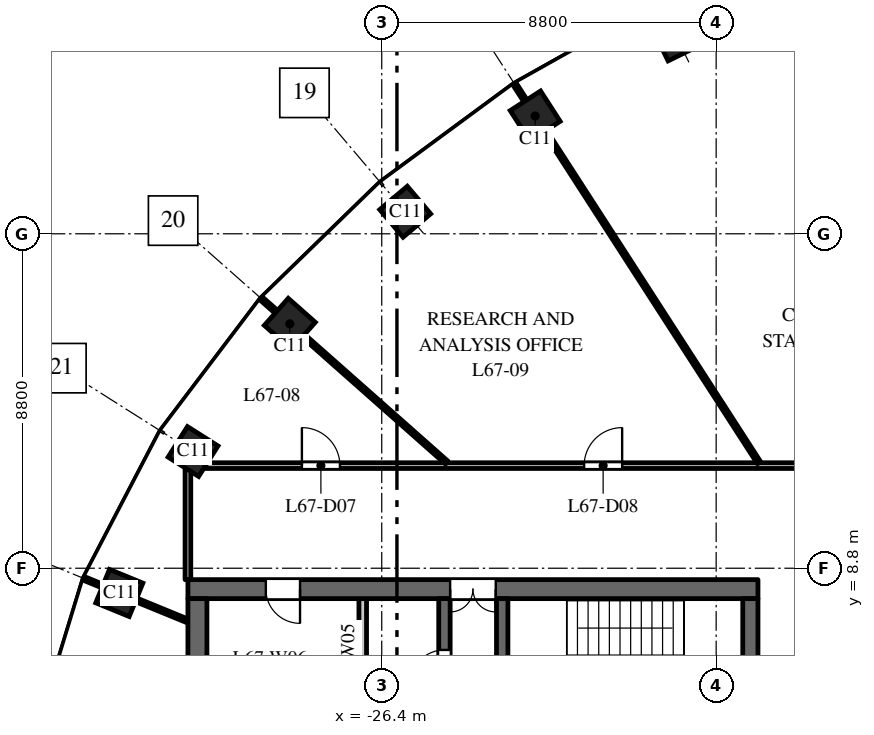
"""IFC4 building model, lengths in metres.
Left out: names, types, materials, properties, quantities, classifications, styles, units other than length and angle.
Written with IfcOpenShell. Run it as: python <this file> out.ifc"""

import sys

from ifc_helpers import new_model, si_unit, direction, frame, frame_2d, origin, origin_2d, place, context, subcontext, project, spatial, rectangle, extrude, element, fill, save


model = new_model("IFC4")
c1 = context("Model", 3, precision=1e-05, world=origin(), true_north=direction((0.0, 1.0)))
c2 = subcontext(c1, "Body", "Model", "MODEL_VIEW")
j1 = project(units=[si_unit("LENGTHUNIT", "METRE"), si_unit("PLANEANGLEUNIT", "RADIAN")], contexts=[c1])
p1 = place(None, origin())
s1 = spatial("IfcSite", under=j1, at=p1, CompositionType="ELEMENT")
p2 = place(p1, origin())
s2 = spatial("IfcBuilding", under=s1, at=p2, CompositionType="ELEMENT")
p3 = place(p2, frame((0.0, 0.0, 311.0)))
s3 = spatial("IfcBuildingStorey", under=s2, at=p3, CompositionType="ELEMENT", Elevation=311.0)
for number, where, z_axis, x_axis in (
    (1, (-18.646, 22.785, 0.0), (0.0, 0.0, 1.0), (-0.898, -0.439, 0.0)),
    (2, (-22.362, 20.7, 0.0), (0.0, 0.0, 1.0), (-0.84, -0.542, 0.0)),
    (3, (-25.783, 18.18, 0.0), (0.0, 0.0, 1.0), (-0.763, -0.646, 0.0)),
    (4, (-28.819, 15.23, 0.0), (0.0, 0.0, 1.0), (-0.663, -0.749, 0.0)),
    (5, (-31.365, 11.871, 0.0), (0.0, 0.0, 1.0), (-0.535, -0.845, 0.0)),
    (6, (-33.305, 8.149, 0.0), (0.0, 0.0, 1.0), (-0.379, -0.925, 0.0)),
):
    element("IfcColumn", number, at=place(p3, frame(where, z_axis=z_axis, x_axis=x_axis)), inside=s3, PredefinedType="COLUMN", context=c2, shape_type="SweptSolid", body=[
        extrude(rectangle(XDim=0.95, YDim=0.95, at=origin_2d()), origin(), (0.0, 0.0, 1.0), 4.0),
    ])
p4 = place(p3, frame((-16.5, 8.25, 0.0), z_axis=(0.0, 0.0, 1.0), x_axis=(-1.0, 0.0, 0.0)))
e7 = element("IfcWall", 7, at=p4, inside=s3, PredefinedType="SHEAR", context=c2, shape_type="SweptSolid", body=[
    extrude(rectangle(XDim=15.0, YDim=0.5, at=frame_2d((7.5, 0.0))), origin(), (0.0, 0.0, 1.0), 3.7),
])
p5 = place(p4, frame((6.9, 0.0, 0.0)))
e8 = element("IfcOpeningElement", 8, at=p5, cuts=e7, PredefinedType="OPENING", context=c2, shape_type="SweptSolid", body=[
    extrude(rectangle(XDim=1.2, YDim=2.1, at=frame_2d((0.6, 1.05))), frame((0.0, 0.26, 0.0), z_axis=(0.0, -1.0, 0.0), x_axis=(1.0, 0.0, 0.0)), (0.0, 0.0, 1.0), 0.52),
])
p6 = place(p4, frame((12.05, 0.0, 0.0)))
e9 = element("IfcOpeningElement", 9, at=p6, cuts=e7, PredefinedType="OPENING", context=c2, shape_type="SweptSolid", body=[
    extrude(rectangle(XDim=0.9, YDim=2.1, at=frame_2d((0.45, 1.05))), frame((0.0, 0.26, 0.0), z_axis=(0.0, -1.0, 0.0), x_axis=(1.0, 0.0, 0.0)), (0.0, 0.0, 1.0), 0.52),
])
p7 = place(p3, frame((-24.75, -8.0, 0.0), z_axis=(0.0, 0.0, 1.0), x_axis=(0.0, 1.0, 0.0)))
e10 = element("IfcWall", 10, at=p7, inside=s3, PredefinedType="SHEAR", context=c2, shape_type="SweptSolid", body=[
    extrude(rectangle(XDim=16.0, YDim=0.3, at=frame_2d((8.0, 0.0))), origin(), (0.0, 0.0, 1.0), 3.7),
])
p8 = place(p7, frame((4.425, 0.0, 0.0)))
e11 = element("IfcOpeningElement", 11, at=p8, cuts=e10, PredefinedType="OPENING", context=c2, shape_type="SweptSolid", body=[
    extrude(rectangle(XDim=1.1, YDim=2.1, at=frame_2d((0.55, 1.05))), frame((0.0, 0.16, 0.0), z_axis=(0.0, -1.0, 0.0), x_axis=(1.0, 0.0, 0.0)), (0.0, 0.0, 1.0), 0.32),
])
p9 = place(p7, frame((7.45, 0.0, 0.0)))
e12 = element("IfcOpeningElement", 12, at=p9, cuts=e10, PredefinedType="OPENING", context=c2, shape_type="SweptSolid", body=[
    extrude(rectangle(XDim=1.1, YDim=2.1, at=frame_2d((0.55, 1.05))), frame((0.0, 0.16, 0.0), z_axis=(0.0, -1.0, 0.0), x_axis=(1.0, 0.0, 0.0)), (0.0, 0.0, 1.0), 0.32),
])
p10 = place(p7, frame((10.575, 0.0, 0.0)))
e13 = element("IfcOpeningElement", 13, at=p10, cuts=e10, PredefinedType="OPENING", context=c2, shape_type="SweptSolid", body=[
    extrude(rectangle(XDim=0.9, YDim=2.1, at=frame_2d((0.45, 1.05))), frame((0.0, 0.16, 0.0), z_axis=(0.0, -1.0, 0.0), x_axis=(1.0, 0.0, 0.0)), (0.0, 0.0, 1.0), 0.32),
])
p11 = place(p7, frame((13.75, 0.0, 0.0)))
e14 = element("IfcOpeningElement", 14, at=p11, cuts=e10, PredefinedType="OPENING", context=c2, shape_type="SweptSolid", body=[
    extrude(rectangle(XDim=0.9, YDim=2.1, at=frame_2d((0.45, 1.05))), frame((0.0, 0.16, 0.0), z_axis=(0.0, -1.0, 0.0), x_axis=(1.0, 0.0, 0.0)), (0.0, 0.0, 1.0), 0.32),
])
p12 = place(p7, frame((1.35, 0.0, 0.0)))
e15 = element("IfcOpeningElement", 15, at=p12, cuts=e10, PredefinedType="OPENING", context=c2, shape_type="SweptSolid", body=[
    extrude(rectangle(XDim=0.9, YDim=2.1, at=frame_2d((0.45, 1.05))), frame((0.0, 0.16, 0.0), z_axis=(0.0, -1.0, 0.0), x_axis=(1.0, 0.0, 0.0)), (0.0, 0.0, 1.0), 0.32),
])
p13 = place(p3, frame((-16.7, -8.0, 0.0), z_axis=(0.0, 0.0, 1.0), x_axis=(0.0, 1.0, 0.0)))
e16 = element("IfcWall", 16, at=p13, inside=s3, PredefinedType="SHEAR", context=c2, shape_type="SweptSolid", body=[
    extrude(rectangle(XDim=16.0, YDim=0.4, at=frame_2d((8.0, 0.0))), origin(), (0.0, 0.0, 1.0), 3.7),
])
p14 = place(p3, frame((-31.25, -8.0, 0.0), z_axis=(0.0, 0.0, 1.0), x_axis=(0.0, 1.0, 0.0)))
e17 = element("IfcWall", 17, at=p14, inside=s3, PredefinedType="SHEAR", context=c2, shape_type="SweptSolid", body=[
    extrude(rectangle(XDim=16.0, YDim=0.5, at=frame_2d((8.0, 0.0))), origin(), (0.0, 0.0, 1.0), 3.7),
])
p15 = place(p3, frame((-26.9, 4.75, 0.0), z_axis=(0.0, 0.0, 1.0), x_axis=(0.0, 1.0, 0.0)))
e18 = element("IfcWall", 18, at=p15, inside=s3, PredefinedType="PARTITIONING", context=c2, shape_type="SweptSolid", body=[
    extrude(rectangle(XDim=3.25, YDim=0.2, at=frame_2d((1.625, 0.0))), origin(), (0.0, 0.0, 1.0), 3.7),
])
p16 = place(p3, frame((-23.23, 2.25, 0.0), z_axis=(0.0, 0.0, 1.0), x_axis=(0.0, 1.0, 0.0)))
e19 = element("IfcWall", 19, at=p16, inside=s3, PredefinedType="SHEAR", context=c2, shape_type="SweptSolid", body=[
    extrude(rectangle(XDim=5.75, YDim=0.3, at=frame_2d((2.875, 0.0))), origin(), (0.0, 0.0, 1.0), 3.7),
])
p17 = place(p16, frame((0.6, 0.0, 0.0)))
e20 = element("IfcOpeningElement", 20, at=p17, cuts=e19, PredefinedType="OPENING", context=c2, shape_type="SweptSolid", body=[
    extrude(rectangle(XDim=1.0, YDim=2.1, at=frame_2d((0.5, 1.05))), frame((0.0, 0.16, 0.0), z_axis=(0.0, -1.0, 0.0), x_axis=(1.0, 0.0, 0.0)), (0.0, 0.0, 1.0), 0.32),
])
p18 = place(p3, frame((-34.234, 8.53, 0.0), z_axis=(0.0, 0.0, 1.0), x_axis=(0.925344112436, -0.379128307542, 0.0)))
e21 = element("IfcWall", 21, at=p18, inside=s3, PredefinedType="PARTITIONING", context=c2, shape_type="SweptSolid", body=[
    extrude(rectangle(XDim=2.954, YDim=0.1, at=frame_2d((1.477, 0.0))), origin(), (0.0, 0.0, 1.0), 3.0),
])
p19 = place(p3, frame((-31.5, 8.5, 0.0), z_axis=(0.0, 0.0, 1.0), x_axis=(0.0, 1.0, 0.0)))
e22 = element("IfcWall", 22, at=p19, inside=s3, PredefinedType="PARTITIONING", context=c2, shape_type="SweptSolid", body=[
    extrude(rectangle(XDim=3.0, YDim=0.15, at=frame_2d((1.5, 0.0))), origin(), (0.0, 0.0, 1.0), 3.0),
])
p20 = place(p3, frame((-31.5, 11.5, 0.0), z_axis=(0.0, 0.0, 1.0), x_axis=(1.0, 0.0, 0.0)))
e23 = element("IfcWall", 23, at=p20, inside=s3, PredefinedType="PARTITIONING", context=c2, shape_type="SweptSolid", body=[
    extrude(rectangle(XDim=21.432, YDim=0.15, at=frame_2d((10.716, 0.0))), origin(), (0.0, 0.0, 1.0), 2.75),
])
p21 = place(p20, frame((2.999, 0.0, 0.0)))
e24 = element("IfcOpeningElement", 24, at=p21, cuts=e23, PredefinedType="OPENING", context=c2, shape_type="SweptSolid", body=[
    extrude(rectangle(XDim=1.0, YDim=2.1, at=frame_2d((0.5, 1.05))), frame((0.0, 0.085, 0.0), z_axis=(0.0, -1.0, 0.0), x_axis=(1.0, 0.0, 0.0)), (0.0, 0.0, 1.0), 0.17),
])
p22 = place(p20, frame((10.426, 0.0, 0.0)))
e25 = element("IfcOpeningElement", 25, at=p22, cuts=e23, PredefinedType="OPENING", context=c2, shape_type="SweptSolid", body=[
    extrude(rectangle(XDim=1.0, YDim=2.1, at=frame_2d((0.5, 1.05))), frame((0.0, 0.085, 0.0), z_axis=(0.0, -1.0, 0.0), x_axis=(1.0, 0.0, 0.0)), (0.0, 0.0, 1.0), 0.17),
])
p23 = place(p20, frame((17.794, 0.0, 0.0)))
e26 = element("IfcOpeningElement", 26, at=p23, cuts=e23, PredefinedType="OPENING", context=c2, shape_type="SweptSolid", body=[
    extrude(rectangle(XDim=1.0, YDim=2.1, at=frame_2d((0.5, 1.05))), frame((0.0, 0.085, 0.0), z_axis=(0.0, -1.0, 0.0), x_axis=(1.0, 0.0, 0.0)), (0.0, 0.0, 1.0), 0.17),
])
p24 = place(p3, frame((-29.569, 15.895, 0.0), z_axis=(0.0, 0.0, 1.0), x_axis=(0.748988695283, -0.662582775461, 0.0)))
e27 = element("IfcWall", 27, at=p24, inside=s3, PredefinedType="PARTITIONING", context=c2, shape_type="SweptSolid", body=[
    extrude(rectangle(XDim=6.516, YDim=0.1, at=frame_2d((3.258, 0.0))), origin(), (0.0, 0.0, 1.0), 3.0),
])
p25 = place(p3, frame((-22.905, 21.542, 0.0), z_axis=(0.0, 0.0, 1.0), x_axis=(0.54229092728, -0.840190782019, 0.0)))
e28 = element("IfcWall", 28, at=p25, inside=s3, PredefinedType="PARTITIONING", context=c2, shape_type="SweptSolid", body=[
    extrude(rectangle(XDim=11.863, YDim=0.1, at=frame_2d((5.931, 0.0))), origin(), (0.0, 0.0, 1.0), 2.75),
])
p26 = place(p5, origin())
e29 = element("IfcDoor", 29, at=p26, inside=s3, OperationType="DOUBLE_DOOR_DOUBLE_SWING", PredefinedType="DOOR", context=c2, shape_type="SweptSolid", body=[
    extrude(rectangle(XDim=1.2, YDim=2.1, at=frame_2d((0.6, 1.05))), frame((0.0, 0.025, 0.0), z_axis=(0.0, -1.0, 0.0), x_axis=(1.0, 0.0, 0.0)), (0.0, 0.0, 1.0), 0.05),
])
fill(e8, e29)
p27 = place(p11, origin())
e30 = element("IfcDoor", 30, at=p27, inside=s3, OperationType="SINGLE_SWING_RIGHT", PredefinedType="DOOR", context=c2, shape_type="SweptSolid", body=[
    extrude(rectangle(XDim=0.9, YDim=2.1, at=frame_2d((0.45, 1.05))), frame((0.0, 0.025, 0.0), z_axis=(0.0, -1.0, 0.0), x_axis=(1.0, 0.0, 0.0)), (0.0, 0.0, 1.0), 0.05),
])
fill(e14, e30)
p28 = place(p6, origin())
e31 = element("IfcDoor", 31, at=p28, inside=s3, OperationType="SINGLE_SWING_RIGHT", PredefinedType="DOOR", context=c2, shape_type="SweptSolid", body=[
    extrude(rectangle(XDim=0.9, YDim=2.1, at=frame_2d((0.45, 1.05))), frame((0.0, 0.025, 0.0), z_axis=(0.0, -1.0, 0.0), x_axis=(1.0, 0.0, 0.0)), (0.0, 0.0, 1.0), 0.05),
])
fill(e9, e31)
p29 = place(p21, origin())
e32 = element("IfcDoor", 32, at=p29, inside=s3, OperationType="SINGLE_SWING_LEFT", PredefinedType="DOOR", context=c2, shape_type="SweptSolid", body=[
    extrude(rectangle(XDim=1.0, YDim=2.1, at=frame_2d((0.5, 1.05))), frame((0.0, 0.025, 0.0), z_axis=(0.0, -1.0, 0.0), x_axis=(1.0, 0.0, 0.0)), (0.0, 0.0, 1.0), 0.05),
])
fill(e24, e32)
p30 = place(p22, origin())
e33 = element("IfcDoor", 33, at=p30, inside=s3, OperationType="SINGLE_SWING_RIGHT", PredefinedType="DOOR", context=c2, shape_type="SweptSolid", body=[
    extrude(rectangle(XDim=1.0, YDim=2.1, at=frame_2d((0.5, 1.05))), frame((0.0, 0.025, 0.0), z_axis=(0.0, -1.0, 0.0), x_axis=(1.0, 0.0, 0.0)), (0.0, 0.0, 1.0), 0.05),
])
fill(e25, e33)
save(model, sys.argv[1])
